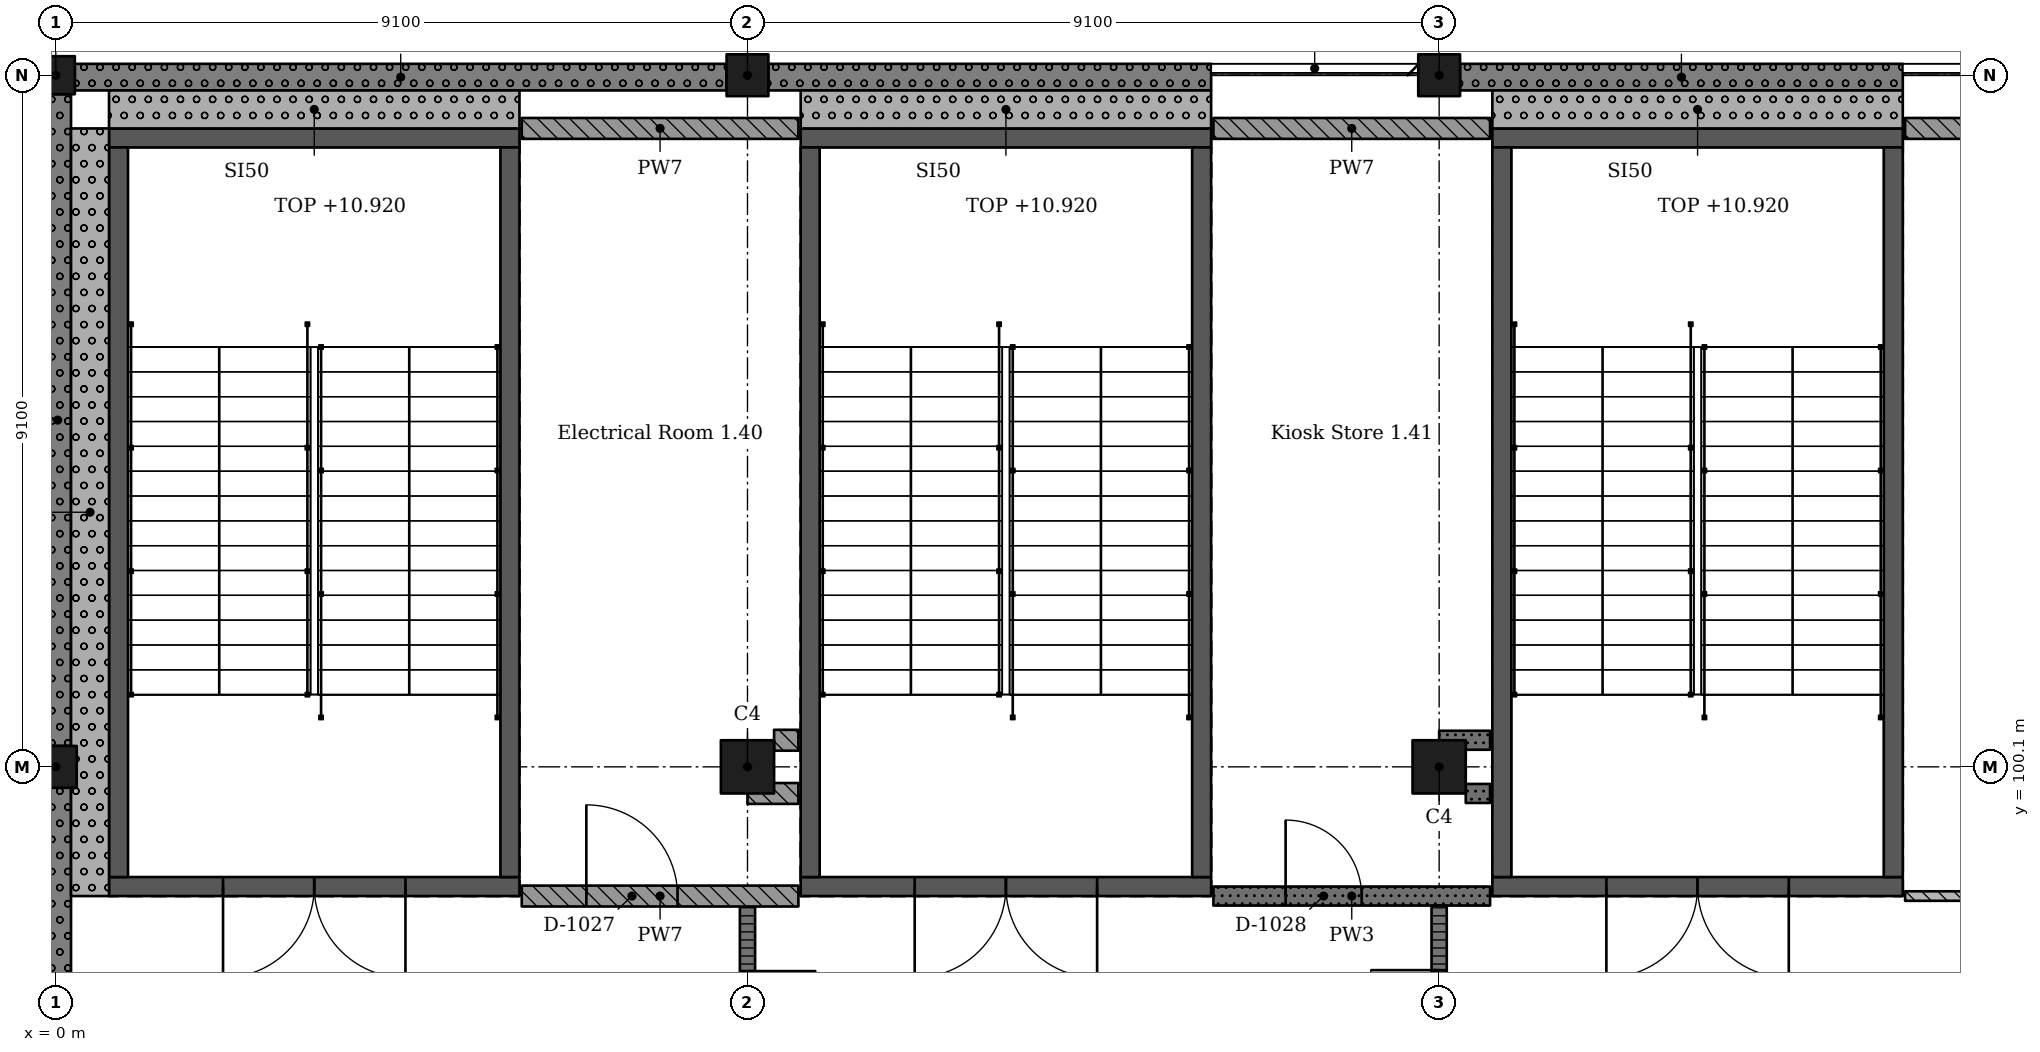
"""IFC4 building model, lengths in metres.
Left out: names, types, materials, properties, quantities, classifications, styles, units other than length and angle.
Written with IfcOpenShell. Run it as: python <this file> out.ifc"""

import sys

from ifc_helpers import new_model, si_unit, direction, frame, frame_2d, origin, origin_2d, place, context, subcontext, project, spatial, rectangle, extrude, element, fill, save


model = new_model("IFC4")
c1 = context("Model", 3, precision=1e-05, world=origin(), true_north=direction((0.0, 1.0)))
c2 = subcontext(c1, "Body", "Model", "MODEL_VIEW")
j1 = project(units=[si_unit("LENGTHUNIT", "METRE"), si_unit("PLANEANGLEUNIT", "RADIAN")], contexts=[c1])
p1 = place(None, origin())
s1 = spatial("IfcSite", under=j1, at=p1, CompositionType="ELEMENT")
p2 = place(p1, origin())
s2 = spatial("IfcBuilding", under=s1, at=p2, CompositionType="ELEMENT")
p3 = place(p2, frame((0.0, 0.0, 6.37)))
s3 = spatial("IfcBuildingStorey", under=s2, at=p3, CompositionType="ELEMENT", Elevation=6.37)
p4 = place(p3, frame((0.0, 100.1, 0.0), z_axis=(0.0, 0.0, 1.0), x_axis=(1.0, 0.0, 0.0)))
e1 = element("IfcColumn", 1, at=p4, inside=s3, PredefinedType="COLUMN", context=c2, shape_type="SweptSolid", body=[
    extrude(rectangle(XDim=0.55, YDim=0.55, at=origin_2d()), origin(), (0.0, 0.0, 1.0), 4.55),
])
p5 = place(p3, frame((0.0, 109.2, 0.0), z_axis=(0.0, 0.0, 1.0), x_axis=(1.0, 0.0, 0.0)))
e2 = element("IfcColumn", 2, at=p5, inside=s3, PredefinedType="COLUMN", context=c2, shape_type="SweptSolid", body=[
    extrude(rectangle(XDim=0.5, YDim=0.5, at=origin_2d()), origin(), (0.0, 0.0, 1.0), 4.55),
])
p6 = place(p3, frame((9.1, 100.1, 0.0), z_axis=(0.0, 0.0, 1.0), x_axis=(1.0, 0.0, 0.0)))
e3 = element("IfcColumn", 3, at=p6, inside=s3, PredefinedType="COLUMN", context=c2, shape_type="SweptSolid", body=[
    extrude(rectangle(XDim=0.7, YDim=0.7, at=origin_2d()), origin(), (0.0, 0.0, 1.0), 4.55),
])
p7 = place(p3, frame((9.1, 109.2, 0.0), z_axis=(0.0, 0.0, 1.0), x_axis=(1.0, 0.0, 0.0)))
e4 = element("IfcColumn", 4, at=p7, inside=s3, PredefinedType="COLUMN", context=c2, shape_type="SweptSolid", body=[
    extrude(rectangle(XDim=0.55, YDim=0.55, at=origin_2d()), origin(), (0.0, 0.0, 1.0), 4.55),
])
p8 = place(p3, frame((18.2, 100.1, 0.0), z_axis=(0.0, 0.0, 1.0), x_axis=(1.0, 0.0, 0.0)))
e5 = element("IfcColumn", 5, at=p8, inside=s3, PredefinedType="COLUMN", context=c2, shape_type="SweptSolid", body=[
    extrude(rectangle(XDim=0.7, YDim=0.7, at=origin_2d()), origin(), (0.0, 0.0, 1.0), 4.55),
])
p9 = place(p3, frame((18.2, 109.2, 0.0), z_axis=(0.0, 0.0, 1.0), x_axis=(1.0, 0.0, 0.0)))
e6 = element("IfcColumn", 6, at=p9, inside=s3, PredefinedType="COLUMN", context=c2, shape_type="SweptSolid", body=[
    extrude(rectangle(XDim=0.55, YDim=0.55, at=origin_2d()), origin(), (0.0, 0.0, 1.0), 4.55),
])
p10 = place(p3, frame((6.1, 98.525, 0.0), z_axis=(0.0, 0.0, 1.0), x_axis=(-1.0, 0.0, 0.0)))
e7 = element("IfcWall", 7, at=p10, inside=s3, PredefinedType="SHEAR", context=c2, shape_type="SweptSolid", body=[
    extrude(rectangle(XDim=5.4, YDim=0.25, at=frame_2d((2.7, 0.0))), origin(), (0.0, 0.0, 1.0), 4.55),
])
p11 = place(p10, frame((1.5, 0.0, 0.0)))
e8 = element("IfcOpeningElement", 8, at=p11, cuts=e7, PredefinedType="OPENING", context=c2, shape_type="SweptSolid", body=[
    extrude(rectangle(XDim=2.4, YDim=2.1, at=frame_2d((1.2, 1.05))), frame((0.0, 0.135, 0.0), z_axis=(0.0, -1.0, 0.0), x_axis=(1.0, 0.0, 0.0)), (0.0, 0.0, 1.0), 0.27),
])
p12 = place(p3, frame((6.1, 108.375, 0.0), z_axis=(0.0, 0.0, 1.0), x_axis=(-1.0, 0.0, 0.0)))
e9 = element("IfcWall", 9, at=p12, inside=s3, PredefinedType="SHEAR", context=c2, shape_type="SweptSolid", body=[
    extrude(rectangle(XDim=5.4, YDim=0.25, at=frame_2d((2.7, 0.0))), origin(), (0.0, 0.0, 1.0), 4.55),
])
for number, where, z_axis, x_axis in (
    (10, (0.825, 108.25, 0.0), (0.0, 0.0, 1.0), (0.0, -1.0, 0.0)),
    (11, (5.975, 108.25, 0.0), (0.0, 0.0, 1.0), (0.0, -1.0, 0.0)),
):
    element("IfcWall", number, at=place(p3, frame(where, z_axis=z_axis, x_axis=x_axis)), inside=s3, PredefinedType="SHEAR", context=c2, shape_type="SweptSolid", body=[
        extrude(rectangle(XDim=9.6, YDim=0.25, at=frame_2d((4.8, 0.0))), origin(), (0.0, 0.0, 1.0), 4.55),
    ])
p13 = place(p3, frame((15.2, 98.525, 0.0), z_axis=(0.0, 0.0, 1.0), x_axis=(-1.0, 0.0, 0.0)))
e12 = element("IfcWall", 12, at=p13, inside=s3, PredefinedType="SHEAR", context=c2, shape_type="SweptSolid", body=[
    extrude(rectangle(XDim=5.4, YDim=0.25, at=frame_2d((2.7, 0.0))), origin(), (0.0, 0.0, 1.0), 4.55),
])
p14 = place(p13, frame((1.5, 0.0, 0.0)))
e13 = element("IfcOpeningElement", 13, at=p14, cuts=e12, PredefinedType="OPENING", context=c2, shape_type="SweptSolid", body=[
    extrude(rectangle(XDim=2.4, YDim=2.1, at=frame_2d((1.2, 1.05))), frame((0.0, 0.135, 0.0), z_axis=(0.0, -1.0, 0.0), x_axis=(1.0, 0.0, 0.0)), (0.0, 0.0, 1.0), 0.27),
])
p15 = place(p3, frame((15.2, 108.375, 0.0), z_axis=(0.0, 0.0, 1.0), x_axis=(-1.0, 0.0, 0.0)))
e14 = element("IfcWall", 14, at=p15, inside=s3, PredefinedType="SHEAR", context=c2, shape_type="SweptSolid", body=[
    extrude(rectangle(XDim=5.4, YDim=0.25, at=frame_2d((2.7, 0.0))), origin(), (0.0, 0.0, 1.0), 4.55),
])
for number, where, z_axis, x_axis in (
    (15, (9.925, 108.25, 0.0), (0.0, 0.0, 1.0), (0.0, -1.0, 0.0)),
    (16, (15.075, 108.25, 0.0), (0.0, 0.0, 1.0), (0.0, -1.0, 0.0)),
):
    element("IfcWall", number, at=place(p3, frame(where, z_axis=z_axis, x_axis=x_axis)), inside=s3, PredefinedType="SHEAR", context=c2, shape_type="SweptSolid", body=[
        extrude(rectangle(XDim=9.6, YDim=0.25, at=frame_2d((4.8, 0.0))), origin(), (0.0, 0.0, 1.0), 4.55),
    ])
p16 = place(p3, frame((24.3, 98.525, 0.0), z_axis=(0.0, 0.0, 1.0), x_axis=(-1.0, 0.0, 0.0)))
e17 = element("IfcWall", 17, at=p16, inside=s3, PredefinedType="SHEAR", context=c2, shape_type="SweptSolid", body=[
    extrude(rectangle(XDim=5.4, YDim=0.25, at=frame_2d((2.7, 0.0))), origin(), (0.0, 0.0, 1.0), 4.55),
])
p17 = place(p16, frame((1.5, 0.0, 0.0)))
e18 = element("IfcOpeningElement", 18, at=p17, cuts=e17, PredefinedType="OPENING", context=c2, shape_type="SweptSolid", body=[
    extrude(rectangle(XDim=2.4, YDim=2.1, at=frame_2d((1.2, 1.05))), frame((0.0, 0.135, 0.0), z_axis=(0.0, -1.0, 0.0), x_axis=(1.0, 0.0, 0.0)), (0.0, 0.0, 1.0), 0.27),
])
p18 = place(p3, frame((24.3, 108.375, 0.0), z_axis=(0.0, 0.0, 1.0), x_axis=(-1.0, 0.0, 0.0)))
e19 = element("IfcWall", 19, at=p18, inside=s3, PredefinedType="SHEAR", context=c2, shape_type="SweptSolid", body=[
    extrude(rectangle(XDim=5.4, YDim=0.25, at=frame_2d((2.7, 0.0))), origin(), (0.0, 0.0, 1.0), 4.55),
])
for number, where, z_axis, x_axis in (
    (20, (19.025, 108.25, 0.0), (0.0, 0.0, 1.0), (0.0, -1.0, 0.0)),
    (21, (24.175, 108.25, 0.0), (0.0, 0.0, 1.0), (0.0, -1.0, 0.0)),
):
    element("IfcWall", number, at=place(p3, frame(where, z_axis=z_axis, x_axis=x_axis)), inside=s3, PredefinedType="SHEAR", context=c2, shape_type="SweptSolid", body=[
        extrude(rectangle(XDim=9.6, YDim=0.25, at=frame_2d((4.8, 0.0))), origin(), (0.0, 0.0, 1.0), 4.55),
    ])
for number, where, z_axis, x_axis in (
    (22, (24.3, 109.175, 0.0), (0.0, 0.0, 1.0), (-1.0, 0.0, 0.0)),
    (23, (15.2, 109.175, 0.0), (0.0, 0.0, 1.0), (-1.0, 0.0, 0.0)),
):
    element("IfcWall", number, at=place(p3, frame(where, z_axis=z_axis, x_axis=x_axis)), inside=s3, PredefinedType="SOLIDWALL", context=c2, shape_type="SweptSolid", body=[
        extrude(rectangle(XDim=5.825, YDim=0.35, at=frame_2d((2.913, 0.0))), origin(), (0.0, 0.0, 1.0), 3.5),
    ])
for number, where, z_axis, x_axis in (
    (24, (8.825, 109.175, 0.0), (0.0, 0.0, 1.0), (-1.0, 0.0, 0.0)),
    (25, (0.025, 108.95, 0.0), (0.0, 0.0, 1.0), (0.0, -1.0, 0.0)),
):
    element("IfcWall", number, at=place(p3, frame(where, z_axis=z_axis, x_axis=x_axis)), inside=s3, PredefinedType="SOLIDWALL", context=c2, shape_type="SweptSolid", body=[
        extrude(rectangle(XDim=8.575, YDim=0.35, at=frame_2d((4.288, 0.0))), origin(), (0.0, 0.0, 1.0), 3.5),
    ])
p19 = place(p3, frame((0.025, 99.825, 0.0), z_axis=(0.0, 0.0, 1.0), x_axis=(0.0, -1.0, 0.0)))
e26 = element("IfcWall", 26, at=p19, inside=s3, PredefinedType="SOLIDWALL", context=c2, shape_type="SweptSolid", body=[
    extrude(rectangle(XDim=8.5, YDim=0.35, at=frame_2d((4.25, 0.0))), origin(), (0.0, 0.0, 1.0), 3.5),
])
p20 = place(p3, frame((0.7, 108.75, 0.0), z_axis=(0.0, 0.0, 1.0), x_axis=(1.0, 0.0, 0.0)))
e27 = element("IfcWall", 27, at=p20, inside=s3, PredefinedType="SOLIDWALL", context=c2, shape_type="SweptSolid", body=[
    extrude(rectangle(XDim=5.4, YDim=0.5, at=frame_2d((2.7, 0.0))), origin(), (0.0, 0.0, 1.0), 4.55),
])
p21 = place(p3, frame((0.45, 98.4, 0.0), z_axis=(0.0, 0.0, 1.0), x_axis=(0.0, 1.0, 0.0)))
e28 = element("IfcWall", 28, at=p21, inside=s3, PredefinedType="SOLIDWALL", context=c2, shape_type="SweptSolid", body=[
    extrude(rectangle(XDim=10.1, YDim=0.5, at=frame_2d((5.05, 0.0))), origin(), (0.0, 0.0, 1.0), 4.25),
])
p22 = place(p3, frame((9.8, 108.75, 0.0), z_axis=(0.0, 0.0, 1.0), x_axis=(1.0, 0.0, 0.0)))
e29 = element("IfcWall", 29, at=p22, inside=s3, PredefinedType="SOLIDWALL", context=c2, shape_type="SweptSolid", body=[
    extrude(rectangle(XDim=5.4, YDim=0.5, at=frame_2d((2.7, 0.0))), origin(), (0.0, 0.0, 1.0), 4.55),
])
p23 = place(p3, frame((18.9, 108.75, 0.0), z_axis=(0.0, 0.0, 1.0), x_axis=(1.0, 0.0, 0.0)))
e30 = element("IfcWall", 30, at=p23, inside=s3, PredefinedType="SOLIDWALL", context=c2, shape_type="SweptSolid", body=[
    extrude(rectangle(XDim=5.4, YDim=0.5, at=frame_2d((2.7, 0.0))), origin(), (0.0, 0.0, 1.0), 4.55),
])
p24 = place(p3, frame((6.13, 98.4, 0.0), z_axis=(0.0, 0.0, 1.0), x_axis=(1.0, 0.0, 0.0)))
e31 = element("IfcWall", 31, at=p24, inside=s3, PredefinedType="SOLIDWALL", context=c2, shape_type="SweptSolid", body=[
    extrude(rectangle(XDim=3.64, YDim=0.275, at=frame_2d((1.82, 0.0))), origin(), (0.0, 0.0, 1.0), 4.25),
])
p25 = place(p24, frame((0.85, 0.0, 0.0)))
e32 = element("IfcOpeningElement", 32, at=p25, cuts=e31, PredefinedType="OPENING", context=c2, shape_type="SweptSolid", body=[
    extrude(rectangle(XDim=1.2, YDim=2.4, at=frame_2d((0.6, 1.2))), frame((0.0, 0.147, 0.0), z_axis=(0.0, -1.0, 0.0), x_axis=(1.0, 0.0, 0.0)), (0.0, 0.0, 1.0), 0.295),
])
p26 = place(p3, frame((6.13, 108.5, 0.0), z_axis=(0.0, 0.0, 1.0), x_axis=(1.0, 0.0, 0.0)))
e33 = element("IfcWall", 33, at=p26, inside=s3, PredefinedType="SOLIDWALL", context=c2, shape_type="SweptSolid", body=[
    extrude(rectangle(XDim=3.64, YDim=0.275, at=frame_2d((1.82, 0.0))), origin(), (0.0, 0.0, 1.0), 4.25),
])
p27 = place(p3, frame((9.1, 98.262, 0.0), z_axis=(0.0, 0.0, 1.0), x_axis=(0.0, -1.0, 0.0)))
e34 = element("IfcWall", 34, at=p27, inside=s3, PredefinedType="PARTITIONING", context=c2, shape_type="SweptSolid", body=[
    extrude(rectangle(XDim=6.863, YDim=0.2, at=frame_2d((3.431, 0.0))), origin(), (0.0, 0.0, 1.0), 3.55),
])
p28 = place(p27, frame((0.85, 0.0, 0.0)))
e35 = element("IfcOpeningElement", 35, at=p28, cuts=e34, PredefinedType="OPENING", context=c2, shape_type="SweptSolid", body=[
    extrude(rectangle(XDim=1.8, YDim=2.4, at=frame_2d((0.9, 1.2))), frame((0.0, 0.11, 0.0), z_axis=(0.0, -1.0, 0.0), x_axis=(1.0, 0.0, 0.0)), (0.0, 0.0, 1.0), 0.22),
])
p29 = place(p27, frame((4.25, 0.0, 0.0)))
e36 = element("IfcOpeningElement", 36, at=p29, cuts=e34, PredefinedType="OPENING", context=c2, shape_type="SweptSolid", body=[
    extrude(rectangle(XDim=1.8, YDim=2.4, at=frame_2d((0.9, 1.2))), frame((0.0, 0.11, 0.0), z_axis=(0.0, -1.0, 0.0), x_axis=(1.0, 0.0, 0.0)), (0.0, 0.0, 1.0), 0.22),
])
p30 = place(p3, frame((9.1, 99.75, 0.0), z_axis=(0.0, 0.0, 1.0), x_axis=(1.0, 0.0, 0.0)))
e37 = element("IfcWall", 37, at=p30, inside=s3, PredefinedType="SOLIDWALL", context=c2, shape_type="SweptSolid", body=[
    extrude(rectangle(XDim=0.67, YDim=0.275, at=frame_2d((0.335, 0.0))), origin(), (0.0, 0.0, 1.0), 4.25),
])
p31 = place(p3, frame((9.77, 100.45, 0.0), z_axis=(0.0, 0.0, 1.0), x_axis=(-1.0, 0.0, 0.0)))
e38 = element("IfcWall", 38, at=p31, inside=s3, PredefinedType="SOLIDWALL", context=c2, shape_type="SweptSolid", body=[
    extrude(rectangle(XDim=0.32, YDim=0.275, at=frame_2d((0.16, 0.0))), origin(), (0.0, 0.0, 1.0), 4.25),
])
p32 = place(p3, frame((15.23, 98.4, 0.0), z_axis=(0.0, 0.0, 1.0), x_axis=(1.0, 0.0, 0.0)))
e39 = element("IfcWall", 39, at=p32, inside=s3, PredefinedType="SOLIDWALL", context=c2, shape_type="SweptSolid", body=[
    extrude(rectangle(XDim=3.64, YDim=0.25, at=frame_2d((1.82, 0.0))), origin(), (0.0, 0.0, 1.0), 4.25),
])
p33 = place(p32, frame((0.95, 0.0, 0.0)))
e40 = element("IfcOpeningElement", 40, at=p33, cuts=e39, PredefinedType="OPENING", context=c2, shape_type="SweptSolid", body=[
    extrude(rectangle(XDim=1.0, YDim=2.1, at=frame_2d((0.5, 1.05))), frame((0.0, 0.135, 0.0), z_axis=(0.0, -1.0, 0.0), x_axis=(1.0, 0.0, 0.0)), (0.0, 0.0, 1.0), 0.27),
])
p34 = place(p3, frame((15.23, 108.5, 0.0), z_axis=(0.0, 0.0, 1.0), x_axis=(1.0, 0.0, 0.0)))
e41 = element("IfcWall", 41, at=p34, inside=s3, PredefinedType="SOLIDWALL", context=c2, shape_type="SweptSolid", body=[
    extrude(rectangle(XDim=3.64, YDim=0.275, at=frame_2d((1.82, 0.0))), origin(), (0.0, 0.0, 1.0), 4.25),
])
p35 = place(p3, frame((18.2, 98.275, 0.0), z_axis=(0.0, 0.0, 1.0), x_axis=(0.0, -1.0, 0.0)))
e42 = element("IfcWall", 42, at=p35, inside=s3, PredefinedType="PARTITIONING", context=c2, shape_type="SweptSolid", body=[
    extrude(rectangle(XDim=6.85, YDim=0.2, at=frame_2d((3.425, 0.0))), origin(), (0.0, 0.0, 1.0), 3.55),
])
p36 = place(p35, frame((0.85, 0.0, 0.0)))
e43 = element("IfcOpeningElement", 43, at=p36, cuts=e42, PredefinedType="OPENING", context=c2, shape_type="SweptSolid", body=[
    extrude(rectangle(XDim=1.8, YDim=2.4, at=frame_2d((0.9, 1.2))), frame((0.0, 0.11, 0.0), z_axis=(0.0, -1.0, 0.0), x_axis=(1.0, 0.0, 0.0)), (0.0, 0.0, 1.0), 0.22),
])
p37 = place(p35, frame((4.25, 0.0, 0.0)))
e44 = element("IfcOpeningElement", 44, at=p37, cuts=e42, PredefinedType="OPENING", context=c2, shape_type="SweptSolid", body=[
    extrude(rectangle(XDim=1.8, YDim=2.4, at=frame_2d((0.9, 1.2))), frame((0.0, 0.11, 0.0), z_axis=(0.0, -1.0, 0.0), x_axis=(1.0, 0.0, 0.0)), (0.0, 0.0, 1.0), 0.22),
])
p38 = place(p3, frame((18.2, 100.45, 0.0), z_axis=(0.0, 0.0, 1.0), x_axis=(1.0, 0.0, 0.0)))
e45 = element("IfcWall", 45, at=p38, inside=s3, PredefinedType="SOLIDWALL", context=c2, shape_type="SweptSolid", body=[
    extrude(rectangle(XDim=0.67, YDim=0.25, at=frame_2d((0.335, 0.0))), origin(), (0.0, 0.0, 1.0), 4.25),
])
p39 = place(p3, frame((18.55, 99.75, 0.0), z_axis=(0.0, 0.0, 1.0), x_axis=(1.0, 0.0, 0.0)))
e46 = element("IfcWall", 46, at=p39, inside=s3, PredefinedType="SOLIDWALL", context=c2, shape_type="SweptSolid", body=[
    extrude(rectangle(XDim=0.32, YDim=0.25, at=frame_2d((0.16, 0.0))), origin(), (0.0, 0.0, 1.0), 4.25),
])
p40 = place(p3, frame((24.33, 98.4, 0.0), z_axis=(0.0, 0.0, 1.0), x_axis=(1.0, 0.0, 0.0)))
e47 = element("IfcWall", 47, at=p40, inside=s3, PredefinedType="PARTITIONING", context=c2, shape_type="SweptSolid", body=[
    extrude(rectangle(XDim=3.64, YDim=0.125, at=frame_2d((1.82, 0.0))), origin(), (0.0, 0.0, 1.0), 4.25),
])
p41 = place(p40, frame((1.35, 0.0, 0.0)))
e48 = element("IfcOpeningElement", 48, at=p41, cuts=e47, PredefinedType="OPENING", context=c2, shape_type="SweptSolid", body=[
    extrude(rectangle(XDim=0.9, YDim=2.1, at=frame_2d((0.45, 1.05))), frame((0.0, 0.073, 0.0), z_axis=(0.0, -1.0, 0.0), x_axis=(1.0, 0.0, 0.0)), (0.0, 0.0, 1.0), 0.145),
])
p42 = place(p3, frame((24.33, 108.5, 0.0), z_axis=(0.0, 0.0, 1.0), x_axis=(1.0, 0.0, 0.0)))
e49 = element("IfcWall", 49, at=p42, inside=s3, PredefinedType="SOLIDWALL", context=c2, shape_type="SweptSolid", body=[
    extrude(rectangle(XDim=3.64, YDim=0.275, at=frame_2d((1.82, 0.0))), origin(), (0.0, 0.0, 1.0), 4.25),
])
p43 = place(p25, origin())
e50 = element("IfcDoor", 50, at=p43, inside=s3, OperationType="SINGLE_SWING_RIGHT", PredefinedType="DOOR", context=c2, shape_type="SweptSolid", body=[
    extrude(rectangle(XDim=1.2, YDim=2.4, at=frame_2d((0.6, 1.2))), frame((0.0, 0.025, 0.0), z_axis=(0.0, -1.0, 0.0), x_axis=(1.0, 0.0, 0.0)), (0.0, 0.0, 1.0), 0.05),
])
fill(e32, e50)
p44 = place(p33, origin())
e51 = element("IfcDoor", 51, at=p44, inside=s3, OperationType="SINGLE_SWING_RIGHT", PredefinedType="DOOR", context=c2, shape_type="SweptSolid", body=[
    extrude(rectangle(XDim=1.0, YDim=2.1, at=frame_2d((0.5, 1.05))), frame((0.0, 0.025, 0.0), z_axis=(0.0, -1.0, 0.0), x_axis=(1.0, 0.0, 0.0)), (0.0, 0.0, 1.0), 0.05),
])
fill(e40, e51)
p45 = place(p28, origin())
e52 = element("IfcDoor", 52, at=p45, inside=s3, OperationType="DOUBLE_DOOR_SINGLE_SWING", PredefinedType="DOOR", context=c2, shape_type="SweptSolid", body=[
    extrude(rectangle(XDim=1.8, YDim=2.4, at=frame_2d((0.9, 1.2))), frame((0.0, 0.025, 0.0), z_axis=(0.0, -1.0, 0.0), x_axis=(1.0, 0.0, 0.0)), (0.0, 0.0, 1.0), 0.05),
])
fill(e35, e52)
p46 = place(p36, origin())
e53 = element("IfcDoor", 53, at=p46, inside=s3, OperationType="DOUBLE_DOOR_SINGLE_SWING", PredefinedType="DOOR", context=c2, shape_type="SweptSolid", body=[
    extrude(rectangle(XDim=1.8, YDim=2.4, at=frame_2d((0.9, 1.2))), frame((0.0, 0.025, 0.0), z_axis=(0.0, -1.0, 0.0), x_axis=(1.0, 0.0, 0.0)), (0.0, 0.0, 1.0), 0.05),
])
fill(e43, e53)
p47 = place(p11, origin())
e54 = element("IfcDoor", 54, at=p47, inside=s3, OperationType="DOUBLE_DOOR_SINGLE_SWING", PredefinedType="DOOR", context=c2, shape_type="SweptSolid", body=[
    extrude(rectangle(XDim=2.4, YDim=2.1, at=frame_2d((1.2, 1.05))), frame((0.0, 0.025, 0.0), z_axis=(0.0, -1.0, 0.0), x_axis=(1.0, 0.0, 0.0)), (0.0, 0.0, 1.0), 0.05),
])
fill(e8, e54)
p48 = place(p14, origin())
e55 = element("IfcDoor", 55, at=p48, inside=s3, OperationType="DOUBLE_DOOR_SINGLE_SWING", PredefinedType="DOOR", context=c2, shape_type="SweptSolid", body=[
    extrude(rectangle(XDim=2.4, YDim=2.1, at=frame_2d((1.2, 1.05))), frame((0.0, 0.025, 0.0), z_axis=(0.0, -1.0, 0.0), x_axis=(1.0, 0.0, 0.0)), (0.0, 0.0, 1.0), 0.05),
])
fill(e13, e55)
p49 = place(p17, origin())
e56 = element("IfcDoor", 56, at=p49, inside=s3, OperationType="DOUBLE_DOOR_SINGLE_SWING", PredefinedType="DOOR", context=c2, shape_type="SweptSolid", body=[
    extrude(rectangle(XDim=2.4, YDim=2.1, at=frame_2d((1.2, 1.05))), frame((0.0, 0.025, 0.0), z_axis=(0.0, -1.0, 0.0), x_axis=(1.0, 0.0, 0.0)), (0.0, 0.0, 1.0), 0.05),
])
fill(e18, e56)
save(model, sys.argv[1])
